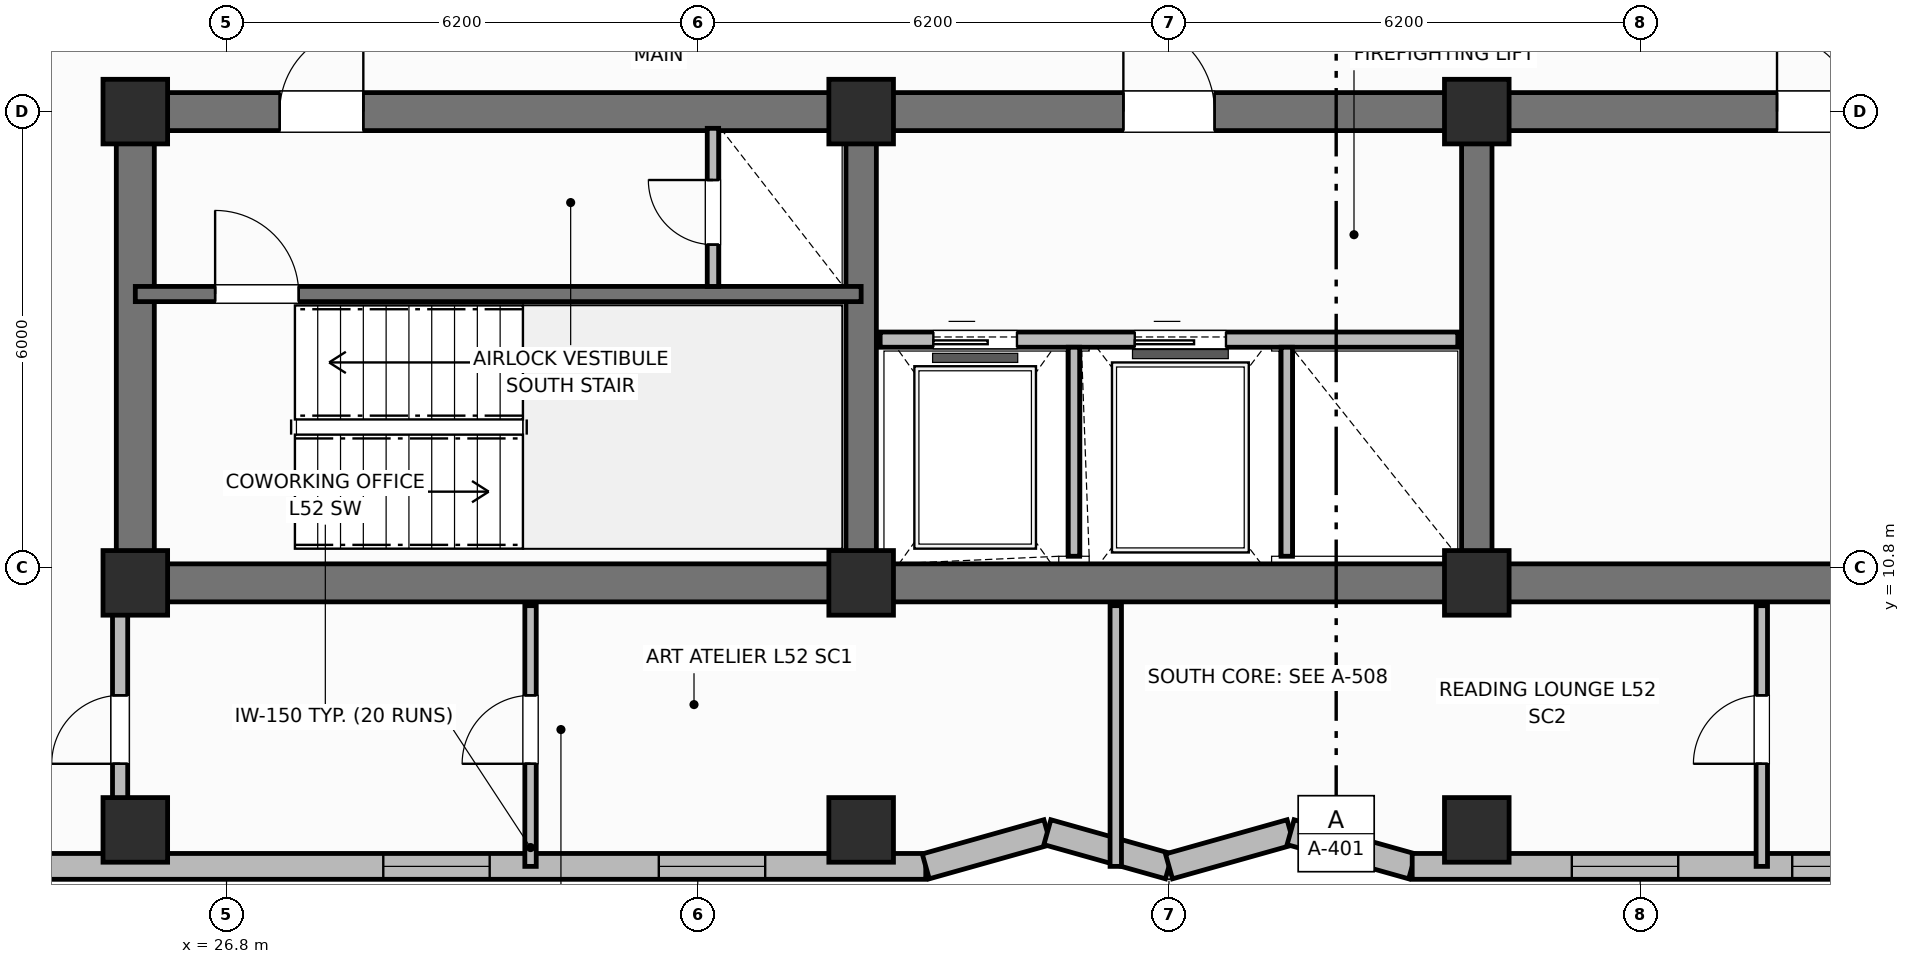
"""IFC4 building model, lengths in metres.
Left out: names, types, materials, properties, quantities, classifications, styles, units other than length and angle.
Written with IfcOpenShell. Run it as: python <this file> out.ifc"""

import sys

from ifc_helpers import new_model, si_unit, direction, frame, frame_2d, origin, origin_2d, place, context, subcontext, project, spatial, rectangle, extrude, element, fill, save


model = new_model("IFC4")
c1 = context("Model", 3, precision=1e-05, world=origin(), true_north=direction((0.0, 1.0)))
c2 = subcontext(c1, "Body", "Model", "MODEL_VIEW")
j1 = project(units=[si_unit("LENGTHUNIT", "METRE"), si_unit("PLANEANGLEUNIT", "RADIAN")], contexts=[c1])
p1 = place(None, origin())
s1 = spatial("IfcSite", under=j1, at=p1, CompositionType="ELEMENT")
p2 = place(p1, origin())
s2 = spatial("IfcBuilding", under=s1, at=p2, CompositionType="ELEMENT")
p3 = place(p2, frame((0.0, 0.0, 211.0)))
s3 = spatial("IfcBuildingStorey", under=s2, at=p3, CompositionType="ELEMENT", Elevation=211.0)
p4 = place(p3, frame((52.8, 10.6, 0.0), z_axis=(0.0, 0.0, 1.0), x_axis=(-1.0, 0.0, 0.0)))
e1 = element("IfcWall", 1, at=p4, inside=s3, PredefinedType="SHEAR", context=c2, shape_type="SweptSolid", body=[
    extrude(rectangle(XDim=27.2, YDim=0.5, at=frame_2d((13.6, 0.0))), origin(), (0.0, 0.0, 1.0), 3.7),
])
p5 = place(p3, frame((25.6, 10.85, 0.0), z_axis=(0.0, 0.0, 1.0), x_axis=(0.0, 1.0, 0.0)))
e2 = element("IfcWall", 2, at=p5, inside=s3, PredefinedType="SHEAR", context=c2, shape_type="SweptSolid", body=[
    extrude(rectangle(XDim=5.7, YDim=0.5, at=frame_2d((2.85, 0.0))), origin(), (0.0, 0.0, 1.0), 3.7),
])
p6 = place(p3, frame((25.6, 16.8, 0.0), z_axis=(0.0, 0.0, 1.0), x_axis=(1.0, 0.0, 0.0)))
e3 = element("IfcWall", 3, at=p6, inside=s3, PredefinedType="SHEAR", context=c2, shape_type="SweptSolid", body=[
    extrude(rectangle(XDim=27.2, YDim=0.5, at=frame_2d((13.6, 0.0))), origin(), (0.0, 0.0, 1.0), 3.7),
])
p7 = place(p6, frame((1.9, 0.0, 0.0)))
e4 = element("IfcOpeningElement", 4, at=p7, cuts=e3, PredefinedType="OPENING", context=c2, shape_type="SweptSolid", body=[
    extrude(rectangle(XDim=1.1, YDim=2.15, at=frame_2d((0.55, 1.075))), frame((0.0, 0.26, 0.0), z_axis=(0.0, -1.0, 0.0), x_axis=(1.0, 0.0, 0.0)), (0.0, 0.0, 1.0), 0.52),
])
p8 = place(p6, frame((13.0, 0.0, 0.0)))
e5 = element("IfcOpeningElement", 5, at=p8, cuts=e3, PredefinedType="OPENING", context=c2, shape_type="SweptSolid", body=[
    extrude(rectangle(XDim=1.2, YDim=2.15, at=frame_2d((0.6, 1.075))), frame((0.0, 0.26, 0.0), z_axis=(0.0, -1.0, 0.0), x_axis=(1.0, 0.0, 0.0)), (0.0, 0.0, 1.0), 0.52),
])
p9 = place(p6, frame((21.6, 0.0, 0.0)))
e6 = element("IfcOpeningElement", 6, at=p9, cuts=e3, PredefinedType="OPENING", context=c2, shape_type="SweptSolid", body=[
    extrude(rectangle(XDim=1.0, YDim=2.15, at=frame_2d((0.5, 1.075))), frame((0.0, 0.26, 0.0), z_axis=(0.0, -1.0, 0.0), x_axis=(1.0, 0.0, 0.0)), (0.0, 0.0, 1.0), 0.52),
])
for number, where, z_axis, x_axis in (
    (7, (35.15, 10.85, 0.0), (0.0, 0.0, 1.0), (0.0, 1.0, 0.0)),
    (8, (43.25, 10.85, 0.0), (0.0, 0.0, 1.0), (0.0, 1.0, 0.0)),
):
    element("IfcWall", number, at=place(p3, frame(where, z_axis=z_axis, x_axis=x_axis)), inside=s3, PredefinedType="SHEAR", context=c2, shape_type="SweptSolid", body=[
        extrude(rectangle(XDim=5.7, YDim=0.4, at=frame_2d((2.85, 0.0))), origin(), (0.0, 0.0, 1.0), 3.7),
    ])
for number, where, z_axis, x_axis in (
    (9, (25.6, 10.6, 0.0), (0.0, 0.0, 1.0), (1.0, 0.0, 0.0)),
    (10, (25.6, 16.8, 0.0), (0.0, 0.0, 1.0), (1.0, 0.0, 0.0)),
    (11, (35.15, 10.6, 0.0), (0.0, 0.0, 1.0), (1.0, 0.0, 0.0)),
    (12, (35.15, 16.8, 0.0), (0.0, 0.0, 1.0), (1.0, 0.0, 0.0)),
    (13, (43.25, 10.6, 0.0), (0.0, 0.0, 1.0), (1.0, 0.0, 0.0)),
    (14, (43.25, 16.8, 0.0), (0.0, 0.0, 1.0), (1.0, 0.0, 0.0)),
    (15, (25.6, 7.35, 0.0), (0.0, 0.0, 1.0), (1.0, 0.0, 0.0)),
    (16, (35.15, 7.35, 0.0), (0.0, 0.0, 1.0), (1.0, 0.0, 0.0)),
    (17, (43.25, 7.35, 0.0), (0.0, 0.0, 1.0), (1.0, 0.0, 0.0)),
):
    element("IfcColumn", number, at=place(p3, frame(where, z_axis=z_axis, x_axis=x_axis)), inside=s3, PredefinedType="COLUMN", context=c2, shape_type="SweptSolid", body=[
        extrude(rectangle(XDim=0.85, YDim=0.85, at=origin_2d()), origin(), (0.0, 0.0, 1.0), 3.7),
    ])
p10 = place(p3, frame((20.2, 6.87, 0.0), z_axis=(0.0, 0.0, 1.0), x_axis=(1.0, 0.0, 0.0)))
e18 = element("IfcWall", 18, at=p10, inside=s3, PredefinedType="SOLIDWALL", context=c2, shape_type="SweptSolid", body=[
    extrude(rectangle(XDim=15.8, YDim=0.34, at=frame_2d((7.9, 0.0))), origin(), (0.0, 0.0, 1.0), 2.72),
])
p11 = place(p10, frame((1.062, 0.0, 0.75)))
e19 = element("IfcOpeningElement", 19, at=p11, cuts=e18, PredefinedType="OPENING", context=c2, shape_type="SweptSolid", body=[
    extrude(rectangle(XDim=1.4, YDim=1.85, at=frame_2d((0.7, 0.925))), frame((0.0, 0.18, 0.0), z_axis=(0.0, -1.0, 0.0), x_axis=(1.0, 0.0, 0.0)), (0.0, 0.0, 1.0), 0.36),
])
p12 = place(p10, frame((8.663, 0.0, 0.75)))
e20 = element("IfcOpeningElement", 20, at=p12, cuts=e18, PredefinedType="OPENING", context=c2, shape_type="SweptSolid", body=[
    extrude(rectangle(XDim=1.4, YDim=1.85, at=frame_2d((0.7, 0.925))), frame((0.0, 0.18, 0.0), z_axis=(0.0, -1.0, 0.0), x_axis=(1.0, 0.0, 0.0)), (0.0, 0.0, 1.0), 0.36),
])
p13 = place(p10, frame((12.288, 0.0, 0.75)))
e21 = element("IfcOpeningElement", 21, at=p13, cuts=e18, PredefinedType="OPENING", context=c2, shape_type="SweptSolid", body=[
    extrude(rectangle(XDim=1.4, YDim=1.85, at=frame_2d((0.7, 0.925))), frame((0.0, 0.18, 0.0), z_axis=(0.0, -1.0, 0.0), x_axis=(1.0, 0.0, 0.0)), (0.0, 0.0, 1.0), 0.36),
])
p14 = place(p3, frame((36.0, 6.87, 0.0), z_axis=(0.0, 0.0, 1.0), x_axis=(0.962662902433, 0.270703040766, 0.0)))
e22 = element("IfcWall", 22, at=p14, inside=s3, PredefinedType="SOLIDWALL", context=c2, shape_type="SweptSolid", body=[
    extrude(rectangle(XDim=1.662, YDim=0.34, at=frame_2d((0.831, 0.0))), origin(), (0.0, 0.0, 1.0), 2.72),
])
p15 = place(p3, frame((37.6, 7.32, 0.0), z_axis=(0.0, 0.0, 1.0), x_axis=(0.962652136636, -0.270741322725, 0.0)))
e23 = element("IfcWall", 23, at=p15, inside=s3, PredefinedType="SOLIDWALL", context=c2, shape_type="SweptSolid", body=[
    extrude(rectangle(XDim=1.662, YDim=0.34, at=frame_2d((0.831, 0.0))), origin(), (0.0, 0.0, 1.0), 2.72),
])
p16 = place(p3, frame((39.2, 6.87, 0.0), z_axis=(0.0, 0.0, 1.0), x_axis=(0.962662902433, 0.270703040766, 0.0)))
e24 = element("IfcWall", 24, at=p16, inside=s3, PredefinedType="SOLIDWALL", context=c2, shape_type="SweptSolid", body=[
    extrude(rectangle(XDim=1.662, YDim=0.34, at=frame_2d((0.831, 0.0))), origin(), (0.0, 0.0, 1.0), 2.72),
])
p17 = place(p3, frame((40.8, 7.32, 0.0), z_axis=(0.0, 0.0, 1.0), x_axis=(0.962652136636, -0.270741322725, 0.0)))
e25 = element("IfcWall", 25, at=p17, inside=s3, PredefinedType="SOLIDWALL", context=c2, shape_type="SweptSolid", body=[
    extrude(rectangle(XDim=1.662, YDim=0.34, at=frame_2d((0.831, 0.0))), origin(), (0.0, 0.0, 1.0), 2.72),
])
p18 = place(p3, frame((42.4, 6.87, 0.0), z_axis=(0.0, 0.0, 1.0), x_axis=(1.0, 0.0, 0.0)))
e26 = element("IfcWall", 26, at=p18, inside=s3, PredefinedType="SOLIDWALL", context=c2, shape_type="SweptSolid", body=[
    extrude(rectangle(XDim=15.8, YDim=0.34, at=frame_2d((7.9, 0.0))), origin(), (0.0, 0.0, 1.0), 2.72),
])
p19 = place(p18, frame((2.1, 0.0, 0.75)))
e27 = element("IfcOpeningElement", 27, at=p19, cuts=e26, PredefinedType="OPENING", context=c2, shape_type="SweptSolid", body=[
    extrude(rectangle(XDim=1.4, YDim=1.85, at=frame_2d((0.7, 0.925))), frame((0.0, 0.18, 0.0), z_axis=(0.0, -1.0, 0.0), x_axis=(1.0, 0.0, 0.0)), (0.0, 0.0, 1.0), 0.36),
])
p20 = place(p18, frame((5.0, 0.0, 0.75)))
e28 = element("IfcOpeningElement", 28, at=p20, cuts=e26, PredefinedType="OPENING", context=c2, shape_type="SweptSolid", body=[
    extrude(rectangle(XDim=1.4, YDim=1.85, at=frame_2d((0.7, 0.925))), frame((0.0, 0.18, 0.0), z_axis=(0.0, -1.0, 0.0), x_axis=(1.0, 0.0, 0.0)), (0.0, 0.0, 1.0), 0.36),
])
p21 = place(p18, frame((7.2, 0.0, 0.75)))
e29 = element("IfcOpeningElement", 29, at=p21, cuts=e26, PredefinedType="OPENING", context=c2, shape_type="SweptSolid", body=[
    extrude(rectangle(XDim=1.4, YDim=1.85, at=frame_2d((0.7, 0.925))), frame((0.0, 0.18, 0.0), z_axis=(0.0, -1.0, 0.0), x_axis=(1.0, 0.0, 0.0)), (0.0, 0.0, 1.0), 0.36),
])
p22 = place(p18, frame((13.0, 0.0, 0.75)))
e30 = element("IfcOpeningElement", 30, at=p22, cuts=e26, PredefinedType="OPENING", context=c2, shape_type="SweptSolid", body=[
    extrude(rectangle(XDim=1.4, YDim=1.85, at=frame_2d((0.7, 0.925))), frame((0.0, 0.18, 0.0), z_axis=(0.0, -1.0, 0.0), x_axis=(1.0, 0.0, 0.0)), (0.0, 0.0, 1.0), 0.36),
])
p23 = place(p3, frame((25.6, 14.4, 0.0), z_axis=(0.0, 0.0, 1.0), x_axis=(1.0, 0.0, 0.0)))
e31 = element("IfcWall", 31, at=p23, inside=s3, PredefinedType="SHEAR", context=c2, shape_type="SweptSolid", body=[
    extrude(rectangle(XDim=9.55, YDim=0.2, at=frame_2d((4.775, 0.0))), origin(), (0.0, 0.0, 1.0), 3.7),
])
p24 = place(p23, frame((1.05, 0.0, 0.0)))
e32 = element("IfcOpeningElement", 32, at=p24, cuts=e31, PredefinedType="OPENING", context=c2, shape_type="SweptSolid", body=[
    extrude(rectangle(XDim=1.1, YDim=2.15, at=frame_2d((0.55, 1.075))), frame((0.0, 0.11, 0.0), z_axis=(0.0, -1.0, 0.0), x_axis=(1.0, 0.0, 0.0)), (0.0, 0.0, 1.0), 0.22),
])
p25 = place(p3, frame((33.2, 14.5, 0.0), z_axis=(0.0, 0.0, 1.0), x_axis=(0.0, 1.0, 0.0)))
e33 = element("IfcWall", 33, at=p25, inside=s3, PredefinedType="PARTITIONING", context=c2, shape_type="SweptSolid", body=[
    extrude(rectangle(XDim=2.08, YDim=0.15, at=frame_2d((1.04, 0.0))), origin(), (0.0, 0.0, 1.0), 2.55),
])
p26 = place(p25, frame((0.55, 0.0, 0.0)))
e34 = element("IfcOpeningElement", 34, at=p26, cuts=e33, PredefinedType="OPENING", context=c2, shape_type="SweptSolid", body=[
    extrude(rectangle(XDim=0.85, YDim=2.05, at=frame_2d((0.425, 1.025))), frame((0.0, 0.085, 0.0), z_axis=(0.0, -1.0, 0.0), x_axis=(1.0, 0.0, 0.0)), (0.0, 0.0, 1.0), 0.17),
])
p27 = place(p3, frame((35.4, 13.8, 0.0), z_axis=(0.0, 0.0, 1.0), x_axis=(1.0, 0.0, 0.0)))
e35 = element("IfcWall", 35, at=p27, inside=s3, PredefinedType="PARTITIONING", context=c2, shape_type="SweptSolid", body=[
    extrude(rectangle(XDim=7.6, YDim=0.2, at=frame_2d((3.8, 0.0))), origin(), (0.0, 0.0, 1.0), 2.32),
])
p28 = place(p27, frame((0.7, 0.0, 0.0)))
e36 = element("IfcOpeningElement", 36, at=p28, cuts=e35, PredefinedType="OPENING", context=c2, shape_type="SweptSolid", body=[
    extrude(rectangle(XDim=1.1, YDim=2.15, at=frame_2d((0.55, 1.075))), frame((0.0, 0.11, 0.0), z_axis=(0.0, -1.0, 0.0), x_axis=(1.0, 0.0, 0.0)), (0.0, 0.0, 1.0), 0.22),
])
p29 = place(p27, frame((3.35, 0.0, 0.0)))
e37 = element("IfcOpeningElement", 37, at=p29, cuts=e35, PredefinedType="OPENING", context=c2, shape_type="SweptSolid", body=[
    extrude(rectangle(XDim=1.2, YDim=2.15, at=frame_2d((0.6, 1.075))), frame((0.0, 0.11, 0.0), z_axis=(0.0, -1.0, 0.0), x_axis=(1.0, 0.0, 0.0)), (0.0, 0.0, 1.0), 0.22),
])
for number, where, z_axis, x_axis in (
    (38, (37.95, 10.95, 0.0), (0.0, 0.0, 1.0), (0.0, 1.0, 0.0)),
    (39, (40.75, 10.95, 0.0), (0.0, 0.0, 1.0), (0.0, 1.0, 0.0)),
):
    element("IfcWall", number, at=place(p3, frame(where, z_axis=z_axis, x_axis=x_axis)), inside=s3, PredefinedType="PARTITIONING", context=c2, shape_type="SweptSolid", body=[
        extrude(rectangle(XDim=2.75, YDim=0.15, at=frame_2d((1.375, 0.0))), origin(), (0.0, 0.0, 1.0), 2.55),
    ])
p30 = place(p3, frame((30.8, 6.87, 0.0), z_axis=(0.0, 0.0, 1.0), x_axis=(0.0, 1.0, 0.0)))
e40 = element("IfcWall", 40, at=p30, inside=s3, PredefinedType="PARTITIONING", context=c2, shape_type="SweptSolid", body=[
    extrude(rectangle(XDim=3.43, YDim=0.15, at=frame_2d((1.715, 0.0))), origin(), (0.0, 0.0, 1.0), 2.55),
])
p31 = place(p30, frame((1.35, 0.0, 0.0)))
e41 = element("IfcOpeningElement", 41, at=p31, cuts=e40, PredefinedType="OPENING", context=c2, shape_type="SweptSolid", body=[
    extrude(rectangle(XDim=0.9, YDim=2.1, at=frame_2d((0.45, 1.05))), frame((0.0, 0.085, 0.0), z_axis=(0.0, -1.0, 0.0), x_axis=(1.0, 0.0, 0.0)), (0.0, 0.0, 1.0), 0.17),
])
p32 = place(p3, frame((38.5, 6.87, 0.0), z_axis=(0.0, 0.0, 1.0), x_axis=(0.0, 1.0, 0.0)))
e42 = element("IfcWall", 42, at=p32, inside=s3, PredefinedType="PARTITIONING", context=c2, shape_type="SweptSolid", body=[
    extrude(rectangle(XDim=3.43, YDim=0.15, at=frame_2d((1.715, 0.0))), origin(), (0.0, 0.0, 1.0), 2.55),
])
p33 = place(p3, frame((47.0, 6.87, 0.0), z_axis=(0.0, 0.0, 1.0), x_axis=(0.0, 1.0, 0.0)))
e43 = element("IfcWall", 43, at=p33, inside=s3, PredefinedType="PARTITIONING", context=c2, shape_type="SweptSolid", body=[
    extrude(rectangle(XDim=3.43, YDim=0.15, at=frame_2d((1.715, 0.0))), origin(), (0.0, 0.0, 1.0), 2.55),
])
p34 = place(p33, frame((1.35, 0.0, 0.0)))
e44 = element("IfcOpeningElement", 44, at=p34, cuts=e43, PredefinedType="OPENING", context=c2, shape_type="SweptSolid", body=[
    extrude(rectangle(XDim=0.9, YDim=2.1, at=frame_2d((0.45, 1.05))), frame((0.0, 0.085, 0.0), z_axis=(0.0, -1.0, 0.0), x_axis=(1.0, 0.0, 0.0)), (0.0, 0.0, 1.0), 0.17),
])
p35 = place(p3, frame((25.4, 7.57, 0.0), z_axis=(0.0, 0.0, 1.0), x_axis=(0.0, 1.0, 0.0)))
e45 = element("IfcWall", 45, at=p35, inside=s3, PredefinedType="PARTITIONING", context=c2, shape_type="SweptSolid", body=[
    extrude(rectangle(XDim=2.73, YDim=0.2, at=frame_2d((1.365, 0.0))), origin(), (0.0, 0.0, 1.0), 2.55),
])
p36 = place(p35, frame((0.65, 0.0, 0.0)))
e46 = element("IfcOpeningElement", 46, at=p36, cuts=e45, PredefinedType="OPENING", context=c2, shape_type="SweptSolid", body=[
    extrude(rectangle(XDim=0.9, YDim=2.1, at=frame_2d((0.45, 1.05))), frame((0.0, 0.11, 0.0), z_axis=(0.0, -1.0, 0.0), x_axis=(1.0, 0.0, 0.0)), (0.0, 0.0, 1.0), 0.22),
])
p37 = place(p12, origin())
e47 = element("IfcWindow", 47, at=p37, inside=s3, PartitioningType="SINGLE_PANEL", PredefinedType="WINDOW", context=c2, shape_type="SweptSolid", body=[
    extrude(rectangle(XDim=1.4, YDim=1.85, at=frame_2d((0.7, 0.925))), frame((0.0, 0.03, 0.0), z_axis=(0.0, -1.0, 0.0), x_axis=(1.0, 0.0, 0.0)), (0.0, 0.0, 1.0), 0.06),
])
fill(e20, e47)
p38 = place(p13, origin())
e48 = element("IfcWindow", 48, at=p38, inside=s3, PartitioningType="SINGLE_PANEL", PredefinedType="WINDOW", context=c2, shape_type="SweptSolid", body=[
    extrude(rectangle(XDim=1.4, YDim=1.85, at=frame_2d((0.7, 0.925))), frame((0.0, 0.03, 0.0), z_axis=(0.0, -1.0, 0.0), x_axis=(1.0, 0.0, 0.0)), (0.0, 0.0, 1.0), 0.06),
])
fill(e21, e48)
p39 = place(p19, origin())
e49 = element("IfcWindow", 49, at=p39, inside=s3, PartitioningType="SINGLE_PANEL", PredefinedType="WINDOW", context=c2, shape_type="SweptSolid", body=[
    extrude(rectangle(XDim=1.4, YDim=1.85, at=frame_2d((0.7, 0.925))), frame((0.0, 0.03, 0.0), z_axis=(0.0, -1.0, 0.0), x_axis=(1.0, 0.0, 0.0)), (0.0, 0.0, 1.0), 0.06),
])
fill(e27, e49)
p40 = place(p20, origin())
e50 = element("IfcWindow", 50, at=p40, inside=s3, PartitioningType="SINGLE_PANEL", PredefinedType="WINDOW", context=c2, shape_type="SweptSolid", body=[
    extrude(rectangle(XDim=1.4, YDim=1.85, at=frame_2d((0.7, 0.925))), frame((0.0, 0.03, 0.0), z_axis=(0.0, -1.0, 0.0), x_axis=(1.0, 0.0, 0.0)), (0.0, 0.0, 1.0), 0.06),
])
fill(e28, e50)
p41 = place(p24, origin())
e51 = element("IfcDoor", 51, at=p41, inside=s3, OperationType="SINGLE_SWING_LEFT", PredefinedType="DOOR", context=c2, shape_type="SweptSolid", body=[
    extrude(rectangle(XDim=1.1, YDim=2.15, at=frame_2d((0.55, 1.075))), frame((0.0, 0.025, 0.0), z_axis=(0.0, -1.0, 0.0), x_axis=(1.0, 0.0, 0.0)), (0.0, 0.0, 1.0), 0.05),
])
fill(e32, e51)
p42 = place(p26, origin())
e52 = element("IfcDoor", 52, at=p42, inside=s3, OperationType="SINGLE_SWING_RIGHT", PredefinedType="TRAPDOOR", context=c2, shape_type="SweptSolid", body=[
    extrude(rectangle(XDim=0.85, YDim=2.05, at=frame_2d((0.425, 1.025))), frame((0.0, 0.025, 0.0), z_axis=(0.0, -1.0, 0.0), x_axis=(1.0, 0.0, 0.0)), (0.0, 0.0, 1.0), 0.05),
])
fill(e34, e52)
p43 = place(p28, origin())
e53 = element("IfcDoor", 53, at=p43, inside=s3, OperationType="SLIDING_TO_LEFT", PredefinedType="DOOR", context=c2, shape_type="SweptSolid", body=[
    extrude(rectangle(XDim=1.1, YDim=2.15, at=frame_2d((0.55, 1.075))), frame((0.0, 0.025, 0.0), z_axis=(0.0, -1.0, 0.0), x_axis=(1.0, 0.0, 0.0)), (0.0, 0.0, 1.0), 0.05),
])
fill(e36, e53)
p44 = place(p29, origin())
e54 = element("IfcDoor", 54, at=p44, inside=s3, OperationType="SLIDING_TO_LEFT", PredefinedType="DOOR", context=c2, shape_type="SweptSolid", body=[
    extrude(rectangle(XDim=1.2, YDim=2.15, at=frame_2d((0.6, 1.075))), frame((0.0, 0.025, 0.0), z_axis=(0.0, -1.0, 0.0), x_axis=(1.0, 0.0, 0.0)), (0.0, 0.0, 1.0), 0.05),
])
fill(e37, e54)
p45 = place(p31, origin())
e55 = element("IfcDoor", 55, at=p45, inside=s3, OperationType="SINGLE_SWING_LEFT", PredefinedType="DOOR", context=c2, shape_type="SweptSolid", body=[
    extrude(rectangle(XDim=0.9, YDim=2.1, at=frame_2d((0.45, 1.05))), frame((0.0, 0.025, 0.0), z_axis=(0.0, -1.0, 0.0), x_axis=(1.0, 0.0, 0.0)), (0.0, 0.0, 1.0), 0.05),
])
fill(e41, e55)
p46 = place(p34, origin())
e56 = element("IfcDoor", 56, at=p46, inside=s3, OperationType="SINGLE_SWING_LEFT", PredefinedType="DOOR", context=c2, shape_type="SweptSolid", body=[
    extrude(rectangle(XDim=0.9, YDim=2.1, at=frame_2d((0.45, 1.05))), frame((0.0, 0.025, 0.0), z_axis=(0.0, -1.0, 0.0), x_axis=(1.0, 0.0, 0.0)), (0.0, 0.0, 1.0), 0.05),
])
fill(e44, e56)
p47 = place(p36, origin())
e57 = element("IfcDoor", 57, at=p47, inside=s3, OperationType="SINGLE_SWING_LEFT", PredefinedType="DOOR", context=c2, shape_type="SweptSolid", body=[
    extrude(rectangle(XDim=0.9, YDim=2.1, at=frame_2d((0.45, 1.05))), frame((0.0, 0.025, 0.0), z_axis=(0.0, -1.0, 0.0), x_axis=(1.0, 0.0, 0.0)), (0.0, 0.0, 1.0), 0.05),
])
fill(e46, e57)
p48 = place(p7, origin())
e58 = element("IfcDoor", 58, at=p48, inside=s3, OperationType="SINGLE_SWING_RIGHT", PredefinedType="DOOR", context=c2, shape_type="SweptSolid", body=[
    extrude(rectangle(XDim=1.1, YDim=2.15, at=frame_2d((0.55, 1.075))), frame((0.0, 0.025, 0.0), z_axis=(0.0, -1.0, 0.0), x_axis=(1.0, 0.0, 0.0)), (0.0, 0.0, 1.0), 0.05),
])
fill(e4, e58)
p49 = place(p8, origin())
e59 = element("IfcDoor", 59, at=p49, inside=s3, OperationType="SINGLE_SWING_LEFT", PredefinedType="DOOR", context=c2, shape_type="SweptSolid", body=[
    extrude(rectangle(XDim=1.2, YDim=2.15, at=frame_2d((0.6, 1.075))), frame((0.0, 0.025, 0.0), z_axis=(0.0, -1.0, 0.0), x_axis=(1.0, 0.0, 0.0)), (0.0, 0.0, 1.0), 0.05),
])
fill(e5, e59)
p50 = place(p9, origin())
e60 = element("IfcDoor", 60, at=p50, inside=s3, OperationType="SINGLE_SWING_LEFT", PredefinedType="DOOR", context=c2, shape_type="SweptSolid", body=[
    extrude(rectangle(XDim=1.0, YDim=2.15, at=frame_2d((0.5, 1.075))), frame((0.0, 0.025, 0.0), z_axis=(0.0, -1.0, 0.0), x_axis=(1.0, 0.0, 0.0)), (0.0, 0.0, 1.0), 0.05),
])
fill(e6, e60)
save(model, sys.argv[1])
